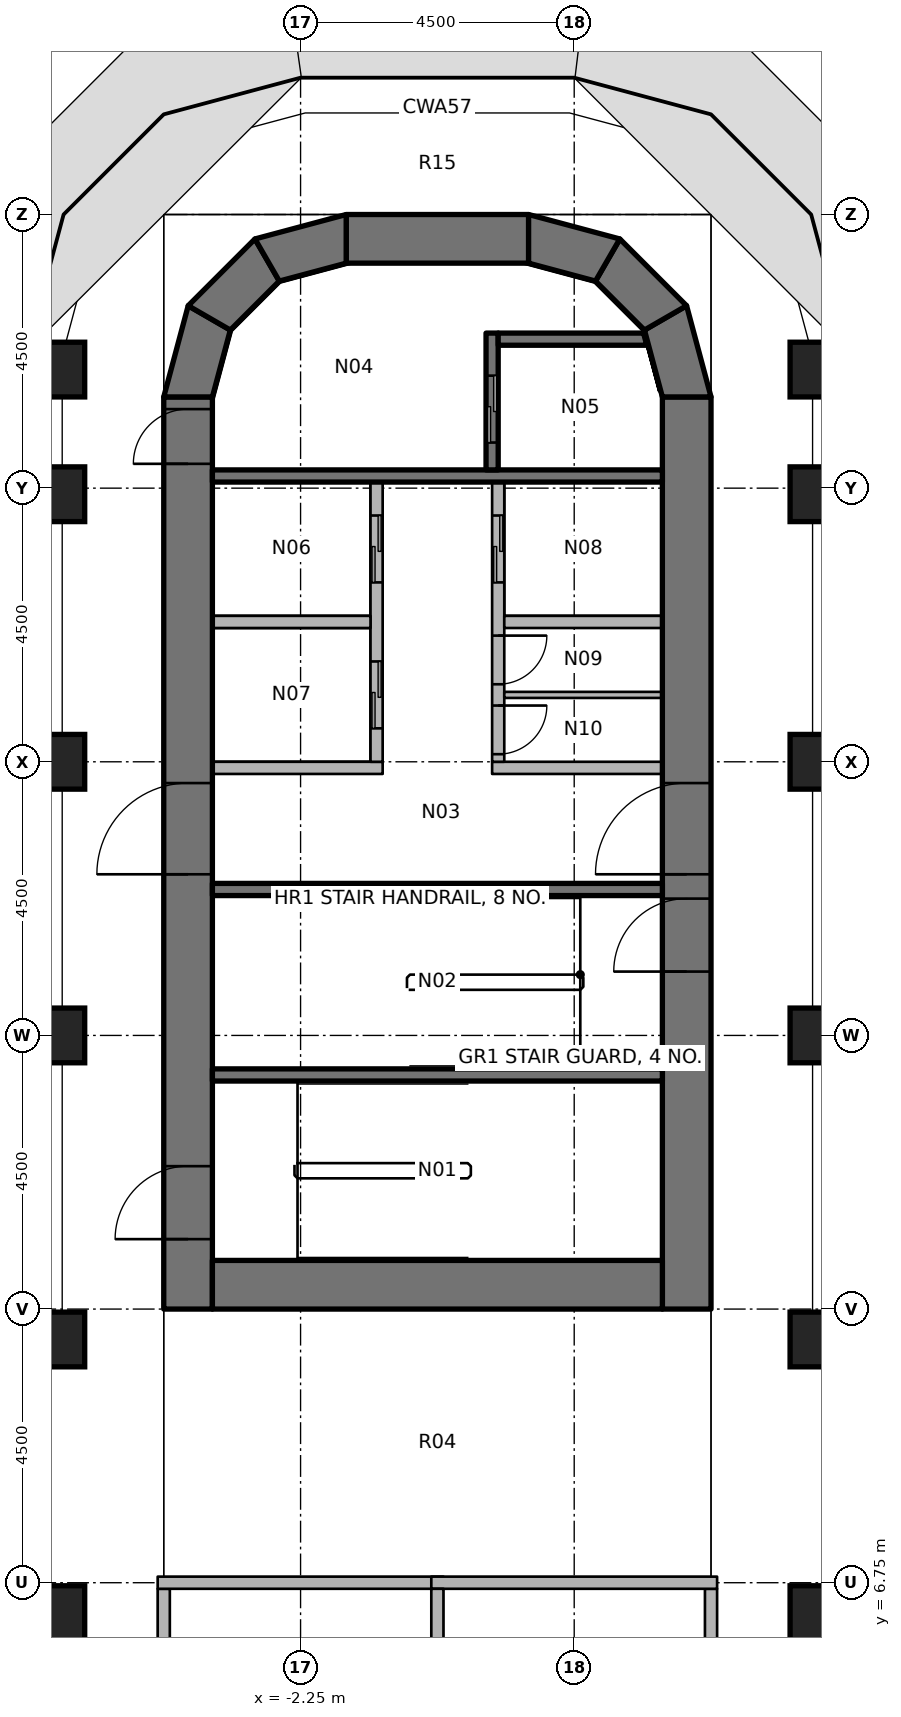
"""IFC4 building model, lengths in metres.
Left out: names, types, materials, properties, quantities, classifications, styles, units other than length and angle.
Written with IfcOpenShell. Run it as: python <this file> out.ifc"""

import sys

from ifc_helpers import new_model, si_unit, direction, frame, frame_2d, origin, origin_2d, place, context, subcontext, project, spatial, polyline, rectangle, outline, extrude, element, fill, save


model = new_model("IFC4")
c1 = context("Model", 3, precision=1e-05, world=origin(), true_north=direction((0.0, 1.0)))
c2 = subcontext(c1, "Body", "Model", "MODEL_VIEW")
j1 = project(units=[si_unit("LENGTHUNIT", "METRE"), si_unit("PLANEANGLEUNIT", "RADIAN")], contexts=[c1])
p1 = place(None, origin())
s1 = spatial("IfcSite", under=j1, at=p1, CompositionType="ELEMENT")
p2 = place(p1, origin())
s2 = spatial("IfcBuilding", under=s1, at=p2, CompositionType="ELEMENT")
p3 = place(p2, frame((0.0, 0.0, 98.0)))
s3 = spatial("IfcBuildingStorey", under=s2, at=p3, CompositionType="ELEMENT", Elevation=98.0)
for number, where, z_axis, x_axis in (
    (1, (-6.25, 6.25, 0.0), (0.0, 0.0, 1.0), (1.0, 0.0, 0.0)),
    (2, (-6.25, 10.75, 0.0), (0.0, 0.0, 1.0), (1.0, 0.0, 0.0)),
    (3, (-6.25, 15.75, 0.0), (0.0, 0.0, 1.0), (1.0, 0.0, 0.0)),
    (4, (-6.25, 20.25, 0.0), (0.0, 0.0, 1.0), (1.0, 0.0, 0.0)),
    (5, (-6.25, 24.65, 0.0), (0.0, 0.0, 1.0), (1.0, 0.0, 0.0)),
    (6, (-6.25, 26.7, 0.0), (0.0, 0.0, 1.0), (1.0, 0.0, 0.0)),
    (7, (6.25, 6.25, 0.0), (0.0, 0.0, 1.0), (1.0, 0.0, 0.0)),
    (8, (6.25, 10.75, 0.0), (0.0, 0.0, 1.0), (1.0, 0.0, 0.0)),
    (9, (6.25, 15.75, 0.0), (0.0, 0.0, 1.0), (1.0, 0.0, 0.0)),
    (10, (6.25, 20.25, 0.0), (0.0, 0.0, 1.0), (1.0, 0.0, 0.0)),
    (11, (6.25, 24.65, 0.0), (0.0, 0.0, 1.0), (1.0, 0.0, 0.0)),
    (12, (6.25, 26.7, 0.0), (0.0, 0.0, 1.0), (1.0, 0.0, 0.0)),
):
    element("IfcColumn", number, at=place(p3, frame(where, z_axis=z_axis, x_axis=x_axis)), inside=s3, PredefinedType="COLUMN", context=c2, shape_type="SweptSolid", body=[
        extrude(rectangle(XDim=0.9, YDim=0.9, at=origin_2d()), origin(), (0.0, 0.0, 1.0), 3.65),
    ])
p4 = place(p3, frame((-4.1, 11.25, 0.0), z_axis=(0.0, 0.0, 1.0), x_axis=(0.0, 1.0, 0.0)))
e13 = element("IfcWall", 13, at=p4, inside=s3, PredefinedType="SHEAR", context=c2, shape_type="SweptSolid", body=[
    extrude(rectangle(XDim=15.0, YDim=0.8, at=frame_2d((7.5, 0.0))), origin(), (0.0, 0.0, 1.0), 3.8),
])
p5 = place(p4, frame((7.15, 0.0, 0.0)))
e14 = element("IfcOpeningElement", 14, at=p5, cuts=e13, PredefinedType="OPENING", context=c2, shape_type="SweptSolid", body=[
    extrude(rectangle(XDim=1.5, YDim=2.3, at=frame_2d((0.75, 1.15))), frame((0.0, 0.41, 0.0), z_axis=(0.0, -1.0, 0.0), x_axis=(1.0, 0.0, 0.0)), (0.0, 0.0, 1.0), 0.82),
])
p6 = place(p4, frame((13.9, 0.0, 0.0)))
e15 = element("IfcOpeningElement", 15, at=p6, cuts=e13, PredefinedType="OPENING", context=c2, shape_type="SweptSolid", body=[
    extrude(rectangle(XDim=0.9, YDim=2.1, at=frame_2d((0.45, 1.05))), frame((0.0, 0.41, 0.0), z_axis=(0.0, -1.0, 0.0), x_axis=(1.0, 0.0, 0.0)), (0.0, 0.0, 1.0), 0.82),
])
p7 = place(p4, frame((1.15, 0.0, 0.0)))
e16 = element("IfcOpeningElement", 16, at=p7, cuts=e13, PredefinedType="OPENING", context=c2, shape_type="SweptSolid", body=[
    extrude(rectangle(XDim=1.2, YDim=2.1, at=frame_2d((0.6, 1.05))), frame((0.0, 0.41, 0.0), z_axis=(0.0, -1.0, 0.0), x_axis=(1.0, 0.0, 0.0)), (0.0, 0.0, 1.0), 0.82),
])
p8 = place(p3, frame((4.1, 11.25, 0.0), z_axis=(0.0, 0.0, 1.0), x_axis=(0.0, 1.0, 0.0)))
e17 = element("IfcWall", 17, at=p8, inside=s3, PredefinedType="SHEAR", context=c2, shape_type="SweptSolid", body=[
    extrude(rectangle(XDim=15.0, YDim=0.8, at=frame_2d((7.5, 0.0))), origin(), (0.0, 0.0, 1.0), 3.8),
])
p9 = place(p8, frame((7.15, 0.0, 0.0)))
e18 = element("IfcOpeningElement", 18, at=p9, cuts=e17, PredefinedType="OPENING", context=c2, shape_type="SweptSolid", body=[
    extrude(rectangle(XDim=1.5, YDim=2.3, at=frame_2d((0.75, 1.15))), frame((0.0, 0.41, 0.0), z_axis=(0.0, -1.0, 0.0), x_axis=(1.0, 0.0, 0.0)), (0.0, 0.0, 1.0), 0.82),
])
p10 = place(p8, frame((5.55, 0.0, 0.0)))
e19 = element("IfcOpeningElement", 19, at=p10, cuts=e17, PredefinedType="OPENING", context=c2, shape_type="SweptSolid", body=[
    extrude(rectangle(XDim=1.2, YDim=2.1, at=frame_2d((0.6, 1.05))), frame((0.0, 0.41, 0.0), z_axis=(0.0, -1.0, 0.0), x_axis=(1.0, 0.0, 0.0)), (0.0, 0.0, 1.0), 0.82),
])
p11 = place(p3, frame((-3.7, 11.65, 0.0), z_axis=(0.0, 0.0, 1.0), x_axis=(1.0, 0.0, 0.0)))
e20 = element("IfcWall", 20, at=p11, inside=s3, PredefinedType="SHEAR", context=c2, shape_type="SweptSolid", body=[
    extrude(rectangle(XDim=7.4, YDim=0.8, at=frame_2d((3.7, 0.0))), origin(), (0.0, 0.0, 1.0), 3.8),
])
p12 = place(p3, frame((-1.5, 28.85, 0.0), z_axis=(0.0, 0.0, 1.0), x_axis=(1.0, 0.0, 0.0)))
e21 = element("IfcWall", 21, at=p12, inside=s3, PredefinedType="SHEAR", context=c2, shape_type="SweptSolid", body=[
    extrude(rectangle(XDim=3.0, YDim=0.8, at=frame_2d((1.5, 0.0))), origin(), (0.0, 0.0, 1.0), 3.8),
])
p13 = place(p3, origin())
e22 = element("IfcWall", 22, at=p13, inside=s3, PredefinedType="SHEAR", context=c2, shape_type="SweptSolid", body=[
    extrude(outline(polyline([(-4.5, 26.25), (-4.098, 27.75), (-3.405, 27.35), (-3.7, 26.25), (-4.5, 26.25)])), origin(), (0.0, 0.0, 1.0), 3.8),
])
p14 = place(p3, origin())
e23 = element("IfcWall", 23, at=p14, inside=s3, PredefinedType="SHEAR", context=c2, shape_type="SweptSolid", body=[
    extrude(outline(polyline([(-4.098, 27.75), (-3.0, 28.848), (-2.6, 28.155), (-3.405, 27.35), (-4.098, 27.75)])), origin(), (0.0, 0.0, 1.0), 3.8),
])
p15 = place(p3, origin())
e24 = element("IfcWall", 24, at=p15, inside=s3, PredefinedType="SHEAR", context=c2, shape_type="SweptSolid", body=[
    extrude(outline(polyline([(-3.0, 28.848), (-1.5, 29.25), (-1.5, 28.45), (-2.6, 28.155), (-3.0, 28.848)])), origin(), (0.0, 0.0, 1.0), 3.8),
])
p16 = place(p3, origin())
e25 = element("IfcWall", 25, at=p16, inside=s3, PredefinedType="SHEAR", context=c2, shape_type="SweptSolid", body=[
    extrude(outline(polyline([(4.5, 26.25), (4.098, 27.75), (3.405, 27.35), (3.7, 26.25), (4.5, 26.25)])), origin(), (0.0, 0.0, 1.0), 3.8),
])
p17 = place(p3, origin())
e26 = element("IfcWall", 26, at=p17, inside=s3, PredefinedType="SHEAR", context=c2, shape_type="SweptSolid", body=[
    extrude(outline(polyline([(4.098, 27.75), (3.0, 28.848), (2.6, 28.155), (3.405, 27.35), (4.098, 27.75)])), origin(), (0.0, 0.0, 1.0), 3.8),
])
p18 = place(p3, origin())
e27 = element("IfcWall", 27, at=p18, inside=s3, PredefinedType="SHEAR", context=c2, shape_type="SweptSolid", body=[
    extrude(outline(polyline([(3.0, 28.848), (1.5, 29.25), (1.5, 28.45), (2.6, 28.155), (3.0, 28.848)])), origin(), (0.0, 0.0, 1.0), 3.8),
])
p19 = place(p3, frame((-3.7, 24.95, 0.0), z_axis=(0.0, 0.0, 1.0), x_axis=(1.0, 0.0, 0.0)))
e28 = element("IfcWall", 28, at=p19, inside=s3, PredefinedType="SHEAR", context=c2, shape_type="SweptSolid", body=[
    extrude(rectangle(XDim=7.4, YDim=0.2, at=frame_2d((3.7, 0.0))), origin(), (0.0, 0.0, 1.0), 3.65),
])
p20 = place(p3, frame((0.9, 27.3, 0.0), z_axis=(0.0, 0.0, 1.0), x_axis=(0.0, -1.0, 0.0)))
e29 = element("IfcWall", 29, at=p20, inside=s3, PredefinedType="SHEAR", context=c2, shape_type="SweptSolid", body=[
    extrude(rectangle(XDim=2.25, YDim=0.2, at=frame_2d((1.125, 0.0))), origin(), (0.0, 0.0, 1.0), 3.65),
])
p21 = place(p20, frame((0.7, 0.0, 0.0)))
e30 = element("IfcOpeningElement", 30, at=p21, cuts=e29, PredefinedType="OPENING", context=c2, shape_type="SweptSolid", body=[
    extrude(rectangle(XDim=1.1, YDim=2.3, at=frame_2d((0.55, 1.15))), frame((0.0, 0.11, 0.0), z_axis=(0.0, -1.0, 0.0), x_axis=(1.0, 0.0, 0.0)), (0.0, 0.0, 1.0), 0.22),
])
p22 = place(p3, origin())
e31 = element("IfcWall", 31, at=p22, inside=s3, PredefinedType="SHEAR", context=c2, shape_type="SweptSolid", body=[
    extrude(outline(polyline([(1.0, 27.1), (3.444, 27.1), (3.39, 27.3), (1.0, 27.3), (1.0, 27.1)])), origin(), (0.0, 0.0, 1.0), 3.65),
])
for number, where, z_axis, x_axis in (
    (32, (-3.7, 18.15, 0.0), (0.0, 0.0, 1.0), (1.0, 0.0, 0.0)),
    (33, (-3.7, 15.1, 0.0), (0.0, 0.0, 1.0), (1.0, 0.0, 0.0)),
):
    element("IfcWall", number, at=place(p3, frame(where, z_axis=z_axis, x_axis=x_axis)), inside=s3, PredefinedType="SHEAR", context=c2, shape_type="SweptSolid", body=[
        extrude(rectangle(XDim=7.4, YDim=0.2, at=frame_2d((3.7, 0.0))), origin(), (0.0, 0.0, 1.0), 3.65),
    ])
p23 = place(p3, frame((-3.7, 20.15, 0.0), z_axis=(0.0, 0.0, 1.0), x_axis=(1.0, 0.0, 0.0)))
e34 = element("IfcWall", 34, at=p23, inside=s3, PredefinedType="PARTITIONING", context=c2, shape_type="SweptSolid", body=[
    extrude(rectangle(XDim=2.8, YDim=0.2, at=frame_2d((1.4, 0.0))), origin(), (0.0, 0.0, 1.0), 3.65),
])
p24 = place(p3, frame((-1.0, 24.85, 0.0), z_axis=(0.0, 0.0, 1.0), x_axis=(0.0, -1.0, 0.0)))
e35 = element("IfcWall", 35, at=p24, inside=s3, PredefinedType="PARTITIONING", context=c2, shape_type="SweptSolid", body=[
    extrude(rectangle(XDim=4.6, YDim=0.2, at=frame_2d((2.3, 0.0))), origin(), (0.0, 0.0, 1.0), 3.65),
])
p25 = place(p24, frame((0.55, 0.0, 0.0)))
e36 = element("IfcOpeningElement", 36, at=p25, cuts=e35, PredefinedType="OPENING", context=c2, shape_type="SweptSolid", body=[
    extrude(rectangle(XDim=1.1, YDim=2.3, at=frame_2d((0.55, 1.15))), frame((0.0, 0.11, 0.0), z_axis=(0.0, -1.0, 0.0), x_axis=(1.0, 0.0, 0.0)), (0.0, 0.0, 1.0), 0.22),
])
p26 = place(p24, frame((2.95, 0.0, 0.0)))
e37 = element("IfcOpeningElement", 37, at=p26, cuts=e35, PredefinedType="OPENING", context=c2, shape_type="SweptSolid", body=[
    extrude(rectangle(XDim=1.1, YDim=2.3, at=frame_2d((0.55, 1.15))), frame((0.0, 0.11, 0.0), z_axis=(0.0, -1.0, 0.0), x_axis=(1.0, 0.0, 0.0)), (0.0, 0.0, 1.0), 0.22),
])
p27 = place(p3, frame((0.9, 20.15, 0.0), z_axis=(0.0, 0.0, 1.0), x_axis=(1.0, 0.0, 0.0)))
e38 = element("IfcWall", 38, at=p27, inside=s3, PredefinedType="PARTITIONING", context=c2, shape_type="SweptSolid", body=[
    extrude(rectangle(XDim=2.8, YDim=0.2, at=frame_2d((1.4, 0.0))), origin(), (0.0, 0.0, 1.0), 3.65),
])
p28 = place(p3, frame((1.0, 24.85, 0.0), z_axis=(0.0, 0.0, 1.0), x_axis=(0.0, -1.0, 0.0)))
e39 = element("IfcWall", 39, at=p28, inside=s3, PredefinedType="PARTITIONING", context=c2, shape_type="SweptSolid", body=[
    extrude(rectangle(XDim=4.6, YDim=0.2, at=frame_2d((2.3, 0.0))), origin(), (0.0, 0.0, 1.0), 3.65),
])
p29 = place(p28, frame((0.55, 0.0, 0.0)))
e40 = element("IfcOpeningElement", 40, at=p29, cuts=e39, PredefinedType="OPENING", context=c2, shape_type="SweptSolid", body=[
    extrude(rectangle(XDim=1.1, YDim=2.3, at=frame_2d((0.55, 1.15))), frame((0.0, 0.11, 0.0), z_axis=(0.0, -1.0, 0.0), x_axis=(1.0, 0.0, 0.0)), (0.0, 0.0, 1.0), 0.22),
])
p30 = place(p28, frame((2.525, 0.0, 0.0)))
e41 = element("IfcOpeningElement", 41, at=p30, cuts=e39, PredefinedType="OPENING", context=c2, shape_type="SweptSolid", body=[
    extrude(rectangle(XDim=0.8, YDim=2.1, at=frame_2d((0.4, 1.05))), frame((0.0, 0.11, 0.0), z_axis=(0.0, -1.0, 0.0), x_axis=(1.0, 0.0, 0.0)), (0.0, 0.0, 1.0), 0.22),
])
p31 = place(p28, frame((3.675, 0.0, 0.0)))
e42 = element("IfcOpeningElement", 42, at=p31, cuts=e39, PredefinedType="OPENING", context=c2, shape_type="SweptSolid", body=[
    extrude(rectangle(XDim=0.8, YDim=2.1, at=frame_2d((0.4, 1.05))), frame((0.0, 0.11, 0.0), z_axis=(0.0, -1.0, 0.0), x_axis=(1.0, 0.0, 0.0)), (0.0, 0.0, 1.0), 0.22),
])
for number, where, z_axis, x_axis in (
    (43, (-3.7, 22.55, 0.0), (0.0, 0.0, 1.0), (1.0, 0.0, 0.0)),
    (44, (1.1, 22.55, 0.0), (0.0, 0.0, 1.0), (1.0, 0.0, 0.0)),
):
    element("IfcWall", number, at=place(p3, frame(where, z_axis=z_axis, x_axis=x_axis)), inside=s3, PredefinedType="PARTITIONING", context=c2, shape_type="SweptSolid", body=[
        extrude(rectangle(XDim=2.6, YDim=0.2, at=frame_2d((1.3, 0.0))), origin(), (0.0, 0.0, 1.0), 3.65),
    ])
p32 = place(p3, frame((1.1, 21.35, 0.0), z_axis=(0.0, 0.0, 1.0), x_axis=(1.0, 0.0, 0.0)))
e45 = element("IfcWall", 45, at=p32, inside=s3, PredefinedType="PARTITIONING", context=c2, shape_type="SweptSolid", body=[
    extrude(rectangle(XDim=2.6, YDim=0.1, at=frame_2d((1.3, 0.0))), origin(), (0.0, 0.0, 1.0), 3.65),
])
p33 = place(p3, frame((-4.5, 6.65, 0.0), z_axis=(0.0, 0.0, 1.0), x_axis=(0.0, -1.0, 0.0)))
e46 = element("IfcWall", 46, at=p33, inside=s3, PredefinedType="PARTITIONING", context=c2, shape_type="SweptSolid", body=[
    extrude(rectangle(XDim=13.3, YDim=0.2, at=frame_2d((6.65, 0.0))), origin(), (0.0, 0.0, 1.0), 2.738),
])
p34 = place(p33, frame((6.15, 0.0, 0.0)))
e47 = element("IfcOpeningElement", 47, at=p34, cuts=e46, PredefinedType="OPENING", context=c2, shape_type="SweptSolid", body=[
    extrude(rectangle(XDim=1.0, YDim=2.1, at=frame_2d((0.5, 1.05))), frame((0.0, 0.11, 0.0), z_axis=(0.0, -1.0, 0.0), x_axis=(1.0, 0.0, 0.0)), (0.0, 0.0, 1.0), 0.22),
])
p35 = place(p3, frame((4.5, 0.1, 0.0), z_axis=(0.0, 0.0, 1.0), x_axis=(0.0, 1.0, 0.0)))
e48 = element("IfcWall", 48, at=p35, inside=s3, PredefinedType="PARTITIONING", context=c2, shape_type="SweptSolid", body=[
    extrude(rectangle(XDim=6.55, YDim=0.2, at=frame_2d((3.275, 0.0))), origin(), (0.0, 0.0, 1.0), 2.738),
])
p36 = place(p35, frame((2.775, 0.0, 0.0)))
e49 = element("IfcOpeningElement", 49, at=p36, cuts=e48, PredefinedType="OPENING", context=c2, shape_type="SweptSolid", body=[
    extrude(rectangle(XDim=1.0, YDim=2.1, at=frame_2d((0.5, 1.05))), frame((0.0, 0.11, 0.0), z_axis=(0.0, -1.0, 0.0), x_axis=(1.0, 0.0, 0.0)), (0.0, 0.0, 1.0), 0.22),
])
for number, where, z_axis, x_axis in (
    (50, (-4.6, 6.75, 0.0), (0.0, 0.0, 1.0), (1.0, 0.0, 0.0)),
    (51, (-0.1, 6.75, 0.0), (0.0, 0.0, 1.0), (1.0, 0.0, 0.0)),
):
    element("IfcWall", number, at=place(p3, frame(where, z_axis=z_axis, x_axis=x_axis)), inside=s3, PredefinedType="PARTITIONING", context=c2, shape_type="SweptSolid", body=[
        extrude(rectangle(XDim=4.7, YDim=0.2, at=frame_2d((2.35, 0.0))), origin(), (0.0, 0.0, 1.0), 2.738),
    ])
p37 = place(p3, frame((0.0, 0.1, 0.0), z_axis=(0.0, 0.0, 1.0), x_axis=(0.0, 1.0, 0.0)))
e52 = element("IfcWall", 52, at=p37, inside=s3, PredefinedType="PARTITIONING", context=c2, shape_type="SweptSolid", body=[
    extrude(rectangle(XDim=6.55, YDim=0.2, at=frame_2d((3.275, 0.0))), origin(), (0.0, 0.0, 1.0), 2.738),
])
p38 = place(p5, origin())
e53 = element("IfcDoor", 53, at=p38, inside=s3, OperationType="DOUBLE_DOOR_SINGLE_SWING", PredefinedType="DOOR", context=c2, shape_type="SweptSolid", body=[
    extrude(rectangle(XDim=1.5, YDim=2.3, at=frame_2d((0.75, 1.15))), frame((0.0, 0.025, 0.0), z_axis=(0.0, -1.0, 0.0), x_axis=(1.0, 0.0, 0.0)), (0.0, 0.0, 1.0), 0.05),
])
fill(e14, e53)
p39 = place(p9, origin())
e54 = element("IfcDoor", 54, at=p39, inside=s3, OperationType="DOUBLE_DOOR_SINGLE_SWING", PredefinedType="DOOR", context=c2, shape_type="SweptSolid", body=[
    extrude(rectangle(XDim=1.5, YDim=2.3, at=frame_2d((0.75, 1.15))), frame((0.0, 0.025, 0.0), z_axis=(0.0, -1.0, 0.0), x_axis=(1.0, 0.0, 0.0)), (0.0, 0.0, 1.0), 0.05),
])
fill(e18, e54)
p40 = place(p6, origin())
e55 = element("IfcDoor", 55, at=p40, inside=s3, OperationType="SINGLE_SWING_LEFT", PredefinedType="DOOR", context=c2, shape_type="SweptSolid", body=[
    extrude(rectangle(XDim=0.9, YDim=2.1, at=frame_2d((0.45, 1.05))), frame((0.0, 0.025, 0.0), z_axis=(0.0, -1.0, 0.0), x_axis=(1.0, 0.0, 0.0)), (0.0, 0.0, 1.0), 0.05),
])
fill(e15, e55)
p41 = place(p10, origin())
e56 = element("IfcDoor", 56, at=p41, inside=s3, OperationType="SINGLE_SWING_RIGHT", PredefinedType="DOOR", context=c2, shape_type="SweptSolid", body=[
    extrude(rectangle(XDim=1.2, YDim=2.1, at=frame_2d((0.6, 1.05))), frame((0.0, 0.025, 0.0), z_axis=(0.0, -1.0, 0.0), x_axis=(1.0, 0.0, 0.0)), (0.0, 0.0, 1.0), 0.05),
])
fill(e19, e56)
p42 = place(p7, origin())
e57 = element("IfcDoor", 57, at=p42, inside=s3, OperationType="SINGLE_SWING_LEFT", PredefinedType="DOOR", context=c2, shape_type="SweptSolid", body=[
    extrude(rectangle(XDim=1.2, YDim=2.1, at=frame_2d((0.6, 1.05))), frame((0.0, 0.025, 0.0), z_axis=(0.0, -1.0, 0.0), x_axis=(1.0, 0.0, 0.0)), (0.0, 0.0, 1.0), 0.05),
])
fill(e16, e57)
p43 = place(p21, origin())
e58 = element("IfcDoor", 58, at=p43, inside=s3, OperationType="DOUBLE_DOOR_SLIDING", PredefinedType="DOOR", context=c2, shape_type="SweptSolid", body=[
    extrude(rectangle(XDim=1.1, YDim=2.3, at=frame_2d((0.55, 1.15))), frame((0.0, 0.025, 0.0), z_axis=(0.0, -1.0, 0.0), x_axis=(1.0, 0.0, 0.0)), (0.0, 0.0, 1.0), 0.05),
])
fill(e30, e58)
p44 = place(p25, origin())
e59 = element("IfcDoor", 59, at=p44, inside=s3, OperationType="DOUBLE_DOOR_SLIDING", PredefinedType="DOOR", context=c2, shape_type="SweptSolid", body=[
    extrude(rectangle(XDim=1.1, YDim=2.3, at=frame_2d((0.55, 1.15))), frame((0.0, 0.025, 0.0), z_axis=(0.0, -1.0, 0.0), x_axis=(1.0, 0.0, 0.0)), (0.0, 0.0, 1.0), 0.05),
])
fill(e36, e59)
p45 = place(p26, origin())
e60 = element("IfcDoor", 60, at=p45, inside=s3, OperationType="DOUBLE_DOOR_SLIDING", PredefinedType="DOOR", context=c2, shape_type="SweptSolid", body=[
    extrude(rectangle(XDim=1.1, YDim=2.3, at=frame_2d((0.55, 1.15))), frame((0.0, 0.025, 0.0), z_axis=(0.0, -1.0, 0.0), x_axis=(1.0, 0.0, 0.0)), (0.0, 0.0, 1.0), 0.05),
])
fill(e37, e60)
p46 = place(p29, origin())
e61 = element("IfcDoor", 61, at=p46, inside=s3, OperationType="DOUBLE_DOOR_SLIDING", PredefinedType="DOOR", context=c2, shape_type="SweptSolid", body=[
    extrude(rectangle(XDim=1.1, YDim=2.3, at=frame_2d((0.55, 1.15))), frame((0.0, 0.025, 0.0), z_axis=(0.0, -1.0, 0.0), x_axis=(1.0, 0.0, 0.0)), (0.0, 0.0, 1.0), 0.05),
])
fill(e40, e61)
p47 = place(p30, origin())
e62 = element("IfcDoor", 62, at=p47, inside=s3, OperationType="SINGLE_SWING_LEFT", PredefinedType="DOOR", context=c2, shape_type="SweptSolid", body=[
    extrude(rectangle(XDim=0.8, YDim=2.1, at=frame_2d((0.4, 1.05))), frame((0.0, 0.025, 0.0), z_axis=(0.0, -1.0, 0.0), x_axis=(1.0, 0.0, 0.0)), (0.0, 0.0, 1.0), 0.05),
])
fill(e41, e62)
p48 = place(p31, origin())
e63 = element("IfcDoor", 63, at=p48, inside=s3, OperationType="SINGLE_SWING_LEFT", PredefinedType="DOOR", context=c2, shape_type="SweptSolid", body=[
    extrude(rectangle(XDim=0.8, YDim=2.1, at=frame_2d((0.4, 1.05))), frame((0.0, 0.025, 0.0), z_axis=(0.0, -1.0, 0.0), x_axis=(1.0, 0.0, 0.0)), (0.0, 0.0, 1.0), 0.05),
])
fill(e42, e63)
save(model, sys.argv[1])
